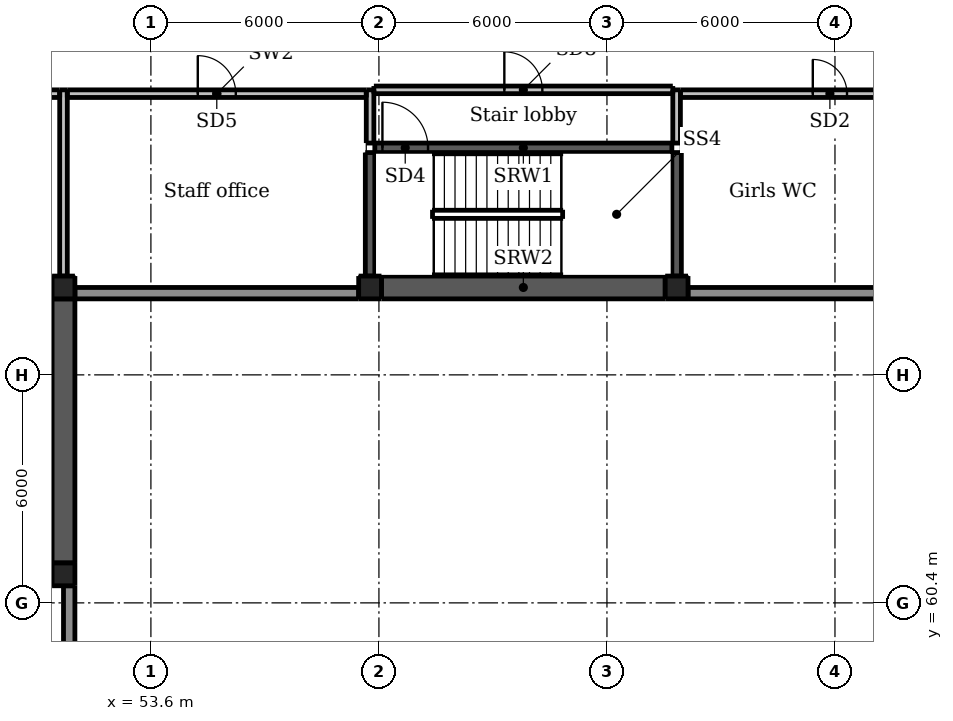
"""IFC4 building model, lengths in metres.
Left out: names, types, materials, properties, quantities, classifications, styles, units other than length and angle.
Written with IfcOpenShell. Run it as: python <this file> out.ifc"""

import sys

from ifc_helpers import new_model, si_unit, direction, frame, frame_2d, origin, origin_2d, place, context, subcontext, project, spatial, rectangle, extrude, element, fill, save


model = new_model("IFC4")
c1 = context("Model", 3, precision=1e-05, world=origin(), true_north=direction((0.0, 1.0)))
c2 = subcontext(c1, "Body", "Model", "MODEL_VIEW")
j1 = project(units=[si_unit("LENGTHUNIT", "METRE"), si_unit("PLANEANGLEUNIT", "RADIAN")], contexts=[c1])
p1 = place(None, origin())
s1 = spatial("IfcSite", under=j1, at=p1, CompositionType="ELEMENT")
p2 = place(p1, origin())
s2 = spatial("IfcBuilding", under=s1, at=p2, CompositionType="ELEMENT")
p3 = place(p2, frame((0.0, 0.0, 19.0)))
s3 = spatial("IfcBuildingStorey", under=s2, at=p3, CompositionType="ELEMENT", Elevation=19.0)
for number, where, z_axis, x_axis in (
    (1, (59.6, 67.4, 0.0), (0.0, 0.0, 1.0), (1.0, 0.0, 0.0)),
    (2, (65.6, 67.4, 0.0), (0.0, 0.0, 1.0), (1.0, 0.0, 0.0)),
    (3, (71.6, 67.4, 0.0), (0.0, 0.0, 1.0), (1.0, 0.0, 0.0)),
    (4, (52.6, 60.4, 0.0), (0.0, 0.0, 1.0), (1.0, 0.0, 0.0)),
):
    element("IfcColumn", number, at=place(p3, frame(where, z_axis=z_axis, x_axis=x_axis)), inside=s3, PredefinedType="COLUMN", context=c2, shape_type="SweptSolid", body=[
        extrude(rectangle(XDim=1.2, YDim=1.2, at=origin_2d()), origin(), (0.0, 0.0, 1.0), 4.25),
    ])
p4 = place(p3, frame((55.2, 64.8, 0.0), z_axis=(0.0, 0.0, 1.0), x_axis=(1.0, 0.0, 0.0)))
e5 = element("IfcColumn", 5, at=p4, inside=s3, PredefinedType="COLUMN", context=c2, shape_type="SweptSolid", body=[
    extrude(rectangle(XDim=3.2, YDim=3.2, at=origin_2d()), origin(), (0.0, 0.0, 1.0), 4.25),
])
for number, where, z_axis, x_axis in (
    (6, (51.3, 61.15, -0.3), (0.0, 0.0, 1.0), (1.0, 0.0, 0.0)),
    (7, (51.3, 68.7, -0.3), (0.0, 0.0, 1.0), (1.0, 0.0, 0.0)),
    (8, (59.367, 68.7, -0.3), (0.0, 0.0, 1.0), (1.0, 0.0, 0.0)),
    (9, (67.433, 68.7, -0.3), (0.0, 0.0, 1.0), (1.0, 0.0, 0.0)),
):
    element("IfcColumn", number, at=place(p3, frame(where, z_axis=z_axis, x_axis=x_axis)), inside=s3, PredefinedType="COLUMN", context=c2, shape_type="SweptSolid", body=[
        extrude(rectangle(XDim=0.6, YDim=0.6, at=origin_2d()), origin(), (0.0, 0.0, 1.0), 4.35),
    ])
p5 = place(p3, frame((51.3, 61.45, -0.3), z_axis=(0.0, 0.0, 1.0), x_axis=(0.0, 1.0, 0.0)))
e10 = element("IfcWall", 10, at=p5, inside=s3, PredefinedType="SHEAR", context=c2, shape_type="SweptSolid", body=[
    extrude(rectangle(XDim=6.95, YDim=0.6, at=frame_2d((3.475, 0.0))), origin(), (0.0, 0.0, 1.0), 4.8),
])
p6 = place(p3, frame((59.492, 72.375, -0.3), z_axis=(0.0, 0.0, 1.0), x_axis=(1.0, 0.0, 0.0)))
e11 = element("IfcWall", 11, at=p6, inside=s3, PredefinedType="SHEAR", context=c2, shape_type="SweptSolid", body=[
    extrude(rectangle(XDim=7.816, YDim=0.25, at=frame_2d((3.908, 0.0))), origin(), (0.0, 0.0, 1.0), 4.8),
])
p7 = place(p6, frame((0.2, 0.0, 0.3)))
e12 = element("IfcOpeningElement", 12, at=p7, cuts=e11, PredefinedType="OPENING", context=c2, shape_type="SweptSolid", body=[
    extrude(rectangle(XDim=1.2, YDim=2.1, at=frame_2d((0.6, 1.05))), frame((0.0, 0.135, 0.0), z_axis=(0.0, -1.0, 0.0), x_axis=(1.0, 0.0, 0.0)), (0.0, 0.0, 1.0), 0.27),
])
for number, where, z_axis, x_axis in (
    (13, (59.367, 69.0, -0.3), (0.0, 0.0, 1.0), (0.0, 1.0, 0.0)),
    (14, (67.433, 69.0, -0.3), (0.0, 0.0, 1.0), (0.0, 1.0, 0.0)),
):
    element("IfcWall", number, at=place(p3, frame(where, z_axis=z_axis, x_axis=x_axis)), inside=s3, PredefinedType="SHEAR", context=c2, shape_type="SweptSolid", body=[
        extrude(rectangle(XDim=3.25, YDim=0.25, at=frame_2d((1.625, 0.0))), origin(), (0.0, 0.0, 1.0), 4.8),
    ])
p8 = place(p3, frame((59.667, 68.7, -0.3), z_axis=(0.0, 0.0, 1.0), x_axis=(1.0, 0.0, 0.0)))
e15 = element("IfcWall", 15, at=p8, inside=s3, PredefinedType="SHEAR", context=c2, shape_type="SweptSolid", body=[
    extrude(rectangle(XDim=7.466, YDim=0.6, at=frame_2d((3.733, 0.0))), origin(), (0.0, 0.0, 1.0), 4.8),
])
p9 = place(p3, frame((52.0, 67.875, 0.0), z_axis=(0.0, 0.0, 1.0), x_axis=(1.0, 0.0, 0.0)))
e16 = element("IfcWall", 16, at=p9, inside=s3, PredefinedType="SOLIDWALL", context=c2, shape_type="SweptSolid", body=[
    extrude(rectangle(XDim=7.0, YDim=0.25, at=frame_2d((3.5, 0.0))), origin(), (0.0, 0.0, 1.0), 4.25),
])
for number, where, z_axis, x_axis in (
    (17, (60.2, 67.875, 0.0), (0.0, 0.0, 1.0), (1.0, 0.0, 0.0)),
    (18, (66.2, 67.875, 0.0), (0.0, 0.0, 1.0), (1.0, 0.0, 0.0)),
    (19, (72.2, 67.875, 0.0), (0.0, 0.0, 1.0), (1.0, 0.0, 0.0)),
    (20, (52.125, 55.0, 0.0), (0.0, 0.0, 1.0), (0.0, 1.0, 0.0)),
):
    element("IfcWall", number, at=place(p3, frame(where, z_axis=z_axis, x_axis=x_axis)), inside=s3, PredefinedType="SOLIDWALL", context=c2, shape_type="SweptSolid", body=[
        extrude(rectangle(XDim=4.8, YDim=0.25, at=frame_2d((2.4, 0.0))), origin(), (0.0, 0.0, 1.0), 4.25),
    ])
p10 = place(p3, frame((52.125, 61.0, 0.0), z_axis=(0.0, 0.0, 1.0), x_axis=(0.0, 1.0, 0.0)))
e21 = element("IfcWall", 21, at=p10, inside=s3, PredefinedType="SOLIDWALL", context=c2, shape_type="SweptSolid", body=[
    extrude(rectangle(XDim=7.0, YDim=0.25, at=frame_2d((3.5, 0.0))), origin(), (0.0, 0.0, 1.0), 4.25),
])
p11 = place(p3, frame((51.45, 53.9, 0.0), z_axis=(0.0, 0.0, 1.0), x_axis=(0.0, 1.0, 0.0)))
e22 = element("IfcWall", 22, at=p11, inside=s3, PredefinedType="SOLIDWALL", context=c2, shape_type="SweptSolid", body=[
    extrude(rectangle(XDim=6.95, YDim=0.3, at=frame_2d((3.475, 0.0))), origin(), (0.0, 0.0, 1.0), 3.15),
])
p12 = place(p3, frame((51.6, 68.55, 0.0), z_axis=(0.0, 0.0, 1.0), x_axis=(1.0, 0.0, 0.0)))
e23 = element("IfcWall", 23, at=p12, inside=s3, PredefinedType="SOLIDWALL", context=c2, shape_type="SweptSolid", body=[
    extrude(rectangle(XDim=7.467, YDim=0.3, at=frame_2d((3.733, 0.0))), origin(), (0.0, 0.0, 1.0), 3.15),
])
p13 = place(p3, frame((67.733, 68.55, 0.0), z_axis=(0.0, 0.0, 1.0), x_axis=(1.0, 0.0, 0.0)))
e24 = element("IfcWall", 24, at=p13, inside=s3, PredefinedType="SOLIDWALL", context=c2, shape_type="SweptSolid", body=[
    extrude(rectangle(XDim=7.467, YDim=0.3, at=frame_2d((3.733, 0.0))), origin(), (0.0, 0.0, 1.0), 3.15),
])
p14 = place(p3, frame((53.2, 60.4, 0.0), z_axis=(0.0, 0.0, 1.0), x_axis=(1.0, 0.0, 0.0)))
e25 = element("IfcWall", 25, at=p14, inside=s3, PredefinedType="PARTITIONING", context=c2, shape_type="SweptSolid", body=[
    extrude(rectangle(XDim=5.95, YDim=0.15, at=frame_2d((2.975, 0.0))), origin(), (0.0, 0.0, 1.0), 3.415),
])
p15 = place(p3, frame((59.15, 60.4, 0.0), z_axis=(0.0, 0.0, 1.0), x_axis=(1.0, 0.0, 0.0)))
e26 = element("IfcWall", 26, at=p15, inside=s3, PredefinedType="PARTITIONING", context=c2, shape_type="SweptSolid", body=[
    extrude(rectangle(XDim=0.9, YDim=0.15, at=frame_2d((0.45, 0.0))), origin(), (0.0, 0.0, 1.0), 2.947),
])
p16 = place(p3, frame((60.05, 60.4, 0.0), z_axis=(0.0, 0.0, 1.0), x_axis=(1.0, 0.0, 0.0)))
e27 = element("IfcWall", 27, at=p16, inside=s3, PredefinedType="PARTITIONING", context=c2, shape_type="SweptSolid", body=[
    extrude(rectangle(XDim=5.404, YDim=0.15, at=frame_2d((2.702, 0.0))), origin(), (0.0, 0.0, 1.0), 4.25),
])
p17 = place(p3, frame((65.454, 60.4, 0.0), z_axis=(0.0, 0.0, 1.0), x_axis=(1.0, 0.0, 0.0)))
e28 = element("IfcWall", 28, at=p17, inside=s3, PredefinedType="PARTITIONING", context=c2, shape_type="SweptSolid", body=[
    extrude(rectangle(XDim=0.292, YDim=0.15, at=frame_2d((0.146, 0.0))), origin(), (0.0, 0.0, 1.0), 3.415),
])
p18 = place(p3, frame((65.746, 60.4, 0.0), z_axis=(0.0, 0.0, 1.0), x_axis=(1.0, 0.0, 0.0)))
e29 = element("IfcWall", 29, at=p18, inside=s3, PredefinedType="PARTITIONING", context=c2, shape_type="SweptSolid", body=[
    extrude(rectangle(XDim=5.708, YDim=0.15, at=frame_2d((2.854, 0.0))), origin(), (0.0, 0.0, 1.0), 4.25),
])
p19 = place(p18, frame((0.204, 0.0, 0.0)))
e30 = element("IfcOpeningElement", 30, at=p19, cuts=e29, PredefinedType="OPENING", context=c2, shape_type="SweptSolid", body=[
    extrude(rectangle(XDim=1.8, YDim=2.1, at=frame_2d((0.9, 1.05))), frame((0.0, 0.085, 0.0), z_axis=(0.0, -1.0, 0.0), x_axis=(1.0, 0.0, 0.0)), (0.0, 0.0, 1.0), 0.17),
])
p20 = place(p3, frame((71.454, 60.4, 0.0), z_axis=(0.0, 0.0, 1.0), x_axis=(1.0, 0.0, 0.0)))
e31 = element("IfcWall", 31, at=p20, inside=s3, PredefinedType="PARTITIONING", context=c2, shape_type="SweptSolid", body=[
    extrude(rectangle(XDim=0.221, YDim=0.15, at=frame_2d((0.11, 0.0))), origin(), (0.0, 0.0, 1.0), 3.415),
])
p21 = place(p3, frame((72.425, 63.4, 0.0), z_axis=(0.0, 0.0, 1.0), x_axis=(1.0, 0.0, 0.0)))
e32 = element("IfcWall", 32, at=p21, inside=s3, PredefinedType="PARTITIONING", context=c2, shape_type="SweptSolid", body=[
    extrude(rectangle(XDim=4.35, YDim=0.15, at=frame_2d((2.175, 0.0))), origin(), (0.0, 0.0, 1.0), 4.25),
])
p22 = place(p21, frame((1.675, 0.0, 0.0)))
e33 = element("IfcOpeningElement", 33, at=p22, cuts=e32, PredefinedType="OPENING", context=c2, shape_type="SweptSolid", body=[
    extrude(rectangle(XDim=1.0, YDim=2.1, at=frame_2d((0.5, 1.05))), frame((0.0, 0.085, 0.0), z_axis=(0.0, -1.0, 0.0), x_axis=(1.0, 0.0, 0.0)), (0.0, 0.0, 1.0), 0.17),
])
p23 = place(p3, frame((59.6, 54.546, 0.0), z_axis=(0.0, 0.0, 1.0), x_axis=(0.0, 1.0, 0.0)))
e34 = element("IfcWall", 34, at=p23, inside=s3, PredefinedType="PARTITIONING", context=c2, shape_type="SweptSolid", body=[
    extrude(rectangle(XDim=5.779, YDim=0.15, at=frame_2d((2.89, 0.0))), origin(), (0.0, 0.0, 1.0), 2.947),
])
p24 = place(p23, frame((2.354, 0.0, 0.0)))
e35 = element("IfcOpeningElement", 35, at=p24, cuts=e34, PredefinedType="OPENING", context=c2, shape_type="SweptSolid", body=[
    extrude(rectangle(XDim=1.0, YDim=2.1, at=frame_2d((0.5, 1.05))), frame((0.0, 0.085, 0.0), z_axis=(0.0, -1.0, 0.0), x_axis=(1.0, 0.0, 0.0)), (0.0, 0.0, 1.0), 0.17),
])
p25 = place(p3, frame((71.6, 60.475, 0.0), z_axis=(0.0, 0.0, 1.0), x_axis=(0.0, 1.0, 0.0)))
e36 = element("IfcWall", 36, at=p25, inside=s3, PredefinedType="PARTITIONING", context=c2, shape_type="SweptSolid", body=[
    extrude(rectangle(XDim=6.325, YDim=0.15, at=frame_2d((3.163, 0.0))), origin(), (0.0, 0.0, 1.0), 3.415),
])
p26 = place(p3, frame((72.5, 63.475, 0.0), z_axis=(0.0, 0.0, 1.0), x_axis=(0.0, 1.0, 0.0)))
e37 = element("IfcWall", 37, at=p26, inside=s3, PredefinedType="PARTITIONING", context=c2, shape_type="SweptSolid", body=[
    extrude(rectangle(XDim=3.83, YDim=0.15, at=frame_2d((1.915, 0.0))), origin(), (0.0, 0.0, 1.0), 4.25),
])
p27 = place(p26, frame((1.075, 0.0, 0.0)))
e38 = element("IfcOpeningElement", 38, at=p27, cuts=e37, PredefinedType="OPENING", context=c2, shape_type="SweptSolid", body=[
    extrude(rectangle(XDim=0.8, YDim=2.1, at=frame_2d((0.4, 1.05))), frame((0.0, 0.085, 0.0), z_axis=(0.0, -1.0, 0.0), x_axis=(1.0, 0.0, 0.0)), (0.0, 0.0, 1.0), 0.17),
])
p28 = place(p3, frame((72.5, 67.305, 0.0), z_axis=(0.0, 0.0, 1.0), x_axis=(0.0, 1.0, 0.0)))
e39 = element("IfcWall", 39, at=p28, inside=s3, PredefinedType="PARTITIONING", context=c2, shape_type="SweptSolid", body=[
    extrude(rectangle(XDim=0.19, YDim=0.15, at=frame_2d((0.095, 0.0))), origin(), (0.0, 0.0, 1.0), 3.797),
])
p29 = place(p3, frame((72.5, 67.495, 0.0), z_axis=(0.0, 0.0, 1.0), x_axis=(0.0, 1.0, 0.0)))
e40 = element("IfcWall", 40, at=p29, inside=s3, PredefinedType="PARTITIONING", context=c2, shape_type="SweptSolid", body=[
    extrude(rectangle(XDim=0.245, YDim=0.15, at=frame_2d((0.123, 0.0))), origin(), (0.0, 0.0, 1.0), 4.25),
])
p30 = place(p3, frame((51.4, 73.8, 0.0), z_axis=(0.0, 0.0, 1.0), x_axis=(1.0, 0.0, 0.0)))
e41 = element("IfcWall", 41, at=p30, inside=s3, PredefinedType="PARTITIONING", context=c2, shape_type="SweptSolid", body=[
    extrude(rectangle(XDim=7.867, YDim=0.2, at=frame_2d((3.934, 0.0))), origin(), (0.0, 0.0, 1.0), 2.85),
])
p31 = place(p30, frame((3.434, 0.0, 0.0)))
e42 = element("IfcOpeningElement", 42, at=p31, cuts=e41, PredefinedType="OPENING", context=c2, shape_type="SweptSolid", body=[
    extrude(rectangle(XDim=1.0, YDim=2.1, at=frame_2d((0.5, 1.05))), frame((0.0, 0.11, 0.0), z_axis=(0.0, -1.0, 0.0), x_axis=(1.0, 0.0, 0.0)), (0.0, 0.0, 1.0), 0.22),
])
p32 = place(p3, frame((67.533, 73.8, 0.0), z_axis=(0.0, 0.0, 1.0), x_axis=(1.0, 0.0, 0.0)))
e43 = element("IfcWall", 43, at=p32, inside=s3, PredefinedType="PARTITIONING", context=c2, shape_type="SweptSolid", body=[
    extrude(rectangle(XDim=7.867, YDim=0.2, at=frame_2d((3.934, 0.0))), origin(), (0.0, 0.0, 1.0), 2.85),
])
p33 = place(p32, frame((3.483, 0.0, 0.0)))
e44 = element("IfcOpeningElement", 44, at=p33, cuts=e43, PredefinedType="OPENING", context=c2, shape_type="SweptSolid", body=[
    extrude(rectangle(XDim=0.9, YDim=2.1, at=frame_2d((0.45, 1.05))), frame((0.0, 0.11, 0.0), z_axis=(0.0, -1.0, 0.0), x_axis=(1.0, 0.0, 0.0)), (0.0, 0.0, 1.0), 0.22),
])
for number, where, z_axis, x_axis in (
    (45, (59.367, 72.5, 0.0), (0.0, 0.0, 1.0), (0.0, 1.0, 0.0)),
    (46, (67.433, 72.5, 0.0), (0.0, 0.0, 1.0), (0.0, 1.0, 0.0)),
):
    element("IfcWall", number, at=place(p3, frame(where, z_axis=z_axis, x_axis=x_axis)), inside=s3, PredefinedType="PARTITIONING", context=c2, shape_type="SweptSolid", body=[
        extrude(rectangle(XDim=1.4, YDim=0.2, at=frame_2d((0.7, 0.0))), origin(), (0.0, 0.0, 1.0), 2.85),
    ])
p34 = place(p3, frame((46.1, 73.8, 0.0), z_axis=(0.0, 0.0, 1.0), x_axis=(1.0, 0.0, 0.0)))
e47 = element("IfcWall", 47, at=p34, inside=s3, PredefinedType="PARTITIONING", context=c2, shape_type="SweptSolid", body=[
    extrude(rectangle(XDim=5.1, YDim=0.2, at=frame_2d((2.55, 0.0))), origin(), (0.0, 0.0, 1.0), 2.85),
])
p35 = place(p3, frame((51.3, 69.0, 0.0), z_axis=(0.0, 0.0, 1.0), x_axis=(0.0, 1.0, 0.0)))
e48 = element("IfcWall", 48, at=p35, inside=s3, PredefinedType="PARTITIONING", context=c2, shape_type="SweptSolid", body=[
    extrude(rectangle(XDim=4.9, YDim=0.2, at=frame_2d((2.45, 0.0))), origin(), (0.0, 0.0, 1.0), 2.85),
])
p36 = place(p3, frame((59.467, 73.9, 0.0), z_axis=(0.0, 0.0, 1.0), x_axis=(1.0, 0.0, 0.0)))
e49 = element("IfcWall", 49, at=p36, inside=s3, PredefinedType="PARTITIONING", context=c2, shape_type="SweptSolid", body=[
    extrude(rectangle(XDim=7.866, YDim=0.2, at=frame_2d((3.933, 0.0))), origin(), (0.0, 0.0, 1.0), 2.85),
])
p37 = place(p36, frame((3.433, 0.0, 0.0)))
e50 = element("IfcOpeningElement", 50, at=p37, cuts=e49, PredefinedType="OPENING", context=c2, shape_type="SweptSolid", body=[
    extrude(rectangle(XDim=1.0, YDim=2.1, at=frame_2d((0.5, 1.05))), frame((0.0, 0.11, 0.0), z_axis=(0.0, -1.0, 0.0), x_axis=(1.0, 0.0, 0.0)), (0.0, 0.0, 1.0), 0.22),
])
p38 = place(p19, origin())
e51 = element("IfcDoor", 51, at=p38, inside=s3, OperationType="DOUBLE_DOOR_SINGLE_SWING", PredefinedType="DOOR", context=c2, shape_type="SweptSolid", body=[
    extrude(rectangle(XDim=1.8, YDim=2.1, at=frame_2d((0.9, 1.05))), frame((0.0, 0.025, 0.0), z_axis=(0.0, -1.0, 0.0), x_axis=(1.0, 0.0, 0.0)), (0.0, 0.0, 1.0), 0.05),
])
fill(e30, e51)
p39 = place(p27, origin())
e52 = element("IfcDoor", 52, at=p39, inside=s3, OperationType="SINGLE_SWING_LEFT", PredefinedType="DOOR", context=c2, shape_type="SweptSolid", body=[
    extrude(rectangle(XDim=0.8, YDim=2.1, at=frame_2d((0.4, 1.05))), frame((0.0, 0.025, 0.0), z_axis=(0.0, -1.0, 0.0), x_axis=(1.0, 0.0, 0.0)), (0.0, 0.0, 1.0), 0.05),
])
fill(e38, e52)
p40 = place(p31, origin())
e53 = element("IfcDoor", 53, at=p40, inside=s3, OperationType="SINGLE_SWING_LEFT", PredefinedType="DOOR", context=c2, shape_type="SweptSolid", body=[
    extrude(rectangle(XDim=1.0, YDim=2.1, at=frame_2d((0.5, 1.05))), frame((0.0, 0.025, 0.0), z_axis=(0.0, -1.0, 0.0), x_axis=(1.0, 0.0, 0.0)), (0.0, 0.0, 1.0), 0.05),
])
fill(e42, e53)
p41 = place(p33, origin())
e54 = element("IfcDoor", 54, at=p41, inside=s3, OperationType="SINGLE_SWING_LEFT", PredefinedType="DOOR", context=c2, shape_type="SweptSolid", body=[
    extrude(rectangle(XDim=0.9, YDim=2.1, at=frame_2d((0.45, 1.05))), frame((0.0, 0.025, 0.0), z_axis=(0.0, -1.0, 0.0), x_axis=(1.0, 0.0, 0.0)), (0.0, 0.0, 1.0), 0.05),
])
fill(e44, e54)
p42 = place(p37, origin())
e55 = element("IfcDoor", 55, at=p42, inside=s3, OperationType="SINGLE_SWING_LEFT", PredefinedType="DOOR", context=c2, shape_type="SweptSolid", body=[
    extrude(rectangle(XDim=1.0, YDim=2.1, at=frame_2d((0.5, 1.05))), frame((0.0, 0.025, 0.0), z_axis=(0.0, -1.0, 0.0), x_axis=(1.0, 0.0, 0.0)), (0.0, 0.0, 1.0), 0.05),
])
fill(e50, e55)
p43 = place(p7, origin())
e56 = element("IfcDoor", 56, at=p43, inside=s3, OperationType="SINGLE_SWING_LEFT", PredefinedType="DOOR", context=c2, shape_type="SweptSolid", body=[
    extrude(rectangle(XDim=1.2, YDim=2.1, at=frame_2d((0.6, 1.05))), frame((0.0, 0.025, 0.0), z_axis=(0.0, -1.0, 0.0), x_axis=(1.0, 0.0, 0.0)), (0.0, 0.0, 1.0), 0.05),
])
fill(e12, e56)
save(model, sys.argv[1])
